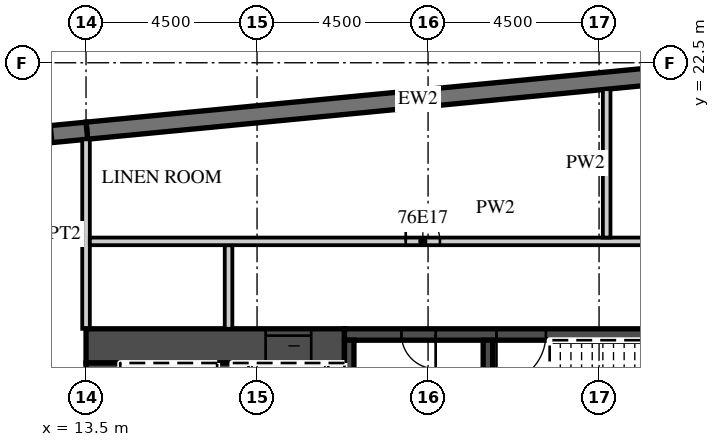
"""IFC4 building model, lengths in metres.
Left out: names, types, materials, properties, quantities, classifications, styles, units other than length and angle.
Written with IfcOpenShell. Run it as: python <this file> out.ifc"""

import sys

from ifc_helpers import new_model, si_unit, direction, frame, frame_2d, origin, place, context, subcontext, project, spatial, rectangle, extrude, element, fill, save


model = new_model("IFC4")
c1 = context("Model", 3, precision=1e-05, world=origin(), true_north=direction((0.0, 1.0)))
c2 = subcontext(c1, "Body", "Model", "MODEL_VIEW")
j1 = project(units=[si_unit("LENGTHUNIT", "METRE"), si_unit("PLANEANGLEUNIT", "RADIAN")], contexts=[c1])
p1 = place(None, origin())
s1 = spatial("IfcSite", under=j1, at=p1, CompositionType="ELEMENT")
p2 = place(p1, origin())
s2 = spatial("IfcBuilding", under=s1, at=p2, CompositionType="ELEMENT")
p3 = place(p2, frame((0.0, 0.0, 301.5)))
s3 = spatial("IfcBuildingStorey", under=s2, at=p3, CompositionType="ELEMENT", Elevation=301.5)
p4 = place(p3, frame((30.946, 22.391, 0.0), z_axis=(0.0, 0.0, 1.0), x_axis=(-0.995396397117, -0.095843688398, 0.0)))
e1 = element("IfcWall", 1, at=p4, inside=s3, PredefinedType="SOLIDWALL", context=c2, shape_type="SweptSolid", body=[
    extrude(rectangle(XDim=17.505, YDim=0.45, at=frame_2d((8.752, 0.0))), origin(), (0.0, 0.0, 1.0), 3.02),
])
p5 = place(p3, frame((13.521, 20.713, 0.0), z_axis=(0.0, 0.0, 1.0), x_axis=(-0.995396277313, -0.095844932638, 0.0)))
e2 = element("IfcWall", 2, at=p5, inside=s3, PredefinedType="SOLIDWALL", context=c2, shape_type="SweptSolid", body=[
    extrude(rectangle(XDim=51.495, YDim=0.45, at=frame_2d((25.748, 0.0))), origin(), (0.0, 0.0, 1.0), 3.02),
])
p6 = place(p5, frame((0.91, 0.0, 0.45)))
e3 = element("IfcOpeningElement", 3, at=p6, cuts=e2, PredefinedType="OPENING", context=c2, shape_type="SweptSolid", body=[
    extrude(rectangle(XDim=2.7, YDim=2.25, at=frame_2d((1.35, 1.125))), frame((0.0, 0.235, 0.0), z_axis=(0.0, -1.0, 0.0), x_axis=(1.0, 0.0, 0.0)), (0.0, 0.0, 1.0), 0.47),
])
p7 = place(p5, frame((5.431, 0.0, 0.45)))
e4 = element("IfcOpeningElement", 4, at=p7, cuts=e2, PredefinedType="OPENING", context=c2, shape_type="SweptSolid", body=[
    extrude(rectangle(XDim=2.7, YDim=2.25, at=frame_2d((1.35, 1.125))), frame((0.0, 0.235, 0.0), z_axis=(0.0, -1.0, 0.0), x_axis=(1.0, 0.0, 0.0)), (0.0, 0.0, 1.0), 0.47),
])
p8 = place(p5, frame((9.952, 0.0, 0.45)))
e5 = element("IfcOpeningElement", 5, at=p8, cuts=e2, PredefinedType="OPENING", context=c2, shape_type="SweptSolid", body=[
    extrude(rectangle(XDim=2.7, YDim=2.25, at=frame_2d((1.35, 1.125))), frame((0.0, 0.235, 0.0), z_axis=(0.0, -1.0, 0.0), x_axis=(1.0, 0.0, 0.0)), (0.0, 0.0, 1.0), 0.47),
])
p9 = place(p5, frame((14.473, 0.0, 0.45)))
e6 = element("IfcOpeningElement", 6, at=p9, cuts=e2, PredefinedType="OPENING", context=c2, shape_type="SweptSolid", body=[
    extrude(rectangle(XDim=2.7, YDim=2.25, at=frame_2d((1.35, 1.125))), frame((0.0, 0.235, 0.0), z_axis=(0.0, -1.0, 0.0), x_axis=(1.0, 0.0, 0.0)), (0.0, 0.0, 1.0), 0.47),
])
p10 = place(p5, frame((18.994, 0.0, 0.45)))
e7 = element("IfcOpeningElement", 7, at=p10, cuts=e2, PredefinedType="OPENING", context=c2, shape_type="SweptSolid", body=[
    extrude(rectangle(XDim=2.7, YDim=2.25, at=frame_2d((1.35, 1.125))), frame((0.0, 0.235, 0.0), z_axis=(0.0, -1.0, 0.0), x_axis=(1.0, 0.0, 0.0)), (0.0, 0.0, 1.0), 0.47),
])
p11 = place(p5, frame((23.514, 0.0, 0.45)))
e8 = element("IfcOpeningElement", 8, at=p11, cuts=e2, PredefinedType="OPENING", context=c2, shape_type="SweptSolid", body=[
    extrude(rectangle(XDim=2.7, YDim=2.25, at=frame_2d((1.35, 1.125))), frame((0.0, 0.235, 0.0), z_axis=(0.0, -1.0, 0.0), x_axis=(1.0, 0.0, 0.0)), (0.0, 0.0, 1.0), 0.47),
])
p12 = place(p5, frame((28.035, 0.0, 0.45)))
e9 = element("IfcOpeningElement", 9, at=p12, cuts=e2, PredefinedType="OPENING", context=c2, shape_type="SweptSolid", body=[
    extrude(rectangle(XDim=2.7, YDim=2.25, at=frame_2d((1.35, 1.125))), frame((0.0, 0.235, 0.0), z_axis=(0.0, -1.0, 0.0), x_axis=(1.0, 0.0, 0.0)), (0.0, 0.0, 1.0), 0.47),
])
p13 = place(p5, frame((32.556, 0.0, 0.45)))
e10 = element("IfcOpeningElement", 10, at=p13, cuts=e2, PredefinedType="OPENING", context=c2, shape_type="SweptSolid", body=[
    extrude(rectangle(XDim=2.7, YDim=2.25, at=frame_2d((1.35, 1.125))), frame((0.0, 0.235, 0.0), z_axis=(0.0, -1.0, 0.0), x_axis=(1.0, 0.0, 0.0)), (0.0, 0.0, 1.0), 0.47),
])
p14 = place(p5, frame((37.077, 0.0, 0.45)))
e11 = element("IfcOpeningElement", 11, at=p14, cuts=e2, PredefinedType="OPENING", context=c2, shape_type="SweptSolid", body=[
    extrude(rectangle(XDim=2.7, YDim=2.25, at=frame_2d((1.35, 1.125))), frame((0.0, 0.235, 0.0), z_axis=(0.0, -1.0, 0.0), x_axis=(1.0, 0.0, 0.0)), (0.0, 0.0, 1.0), 0.47),
])
p15 = place(p5, frame((41.598, 0.0, 0.45)))
e12 = element("IfcOpeningElement", 12, at=p15, cuts=e2, PredefinedType="OPENING", context=c2, shape_type="SweptSolid", body=[
    extrude(rectangle(XDim=2.7, YDim=2.25, at=frame_2d((1.35, 1.125))), frame((0.0, 0.235, 0.0), z_axis=(0.0, -1.0, 0.0), x_axis=(1.0, 0.0, 0.0)), (0.0, 0.0, 1.0), 0.47),
])
p16 = place(p5, frame((46.118, 0.0, 0.45)))
e13 = element("IfcOpeningElement", 13, at=p16, cuts=e2, PredefinedType="OPENING", context=c2, shape_type="SweptSolid", body=[
    extrude(rectangle(XDim=2.7, YDim=2.25, at=frame_2d((1.35, 1.125))), frame((0.0, 0.235, 0.0), z_axis=(0.0, -1.0, 0.0), x_axis=(1.0, 0.0, 0.0)), (0.0, 0.0, 1.0), 0.47),
])
p17 = place(p3, frame((13.5, 15.5, 0.0), z_axis=(0.0, 0.0, 1.0), x_axis=(0.0, 1.0, 0.0)))
e14 = element("IfcWall", 14, at=p17, inside=s3, PredefinedType="PARTITIONING", context=c2, shape_type="SweptSolid", body=[
    extrude(rectangle(XDim=4.985, YDim=0.2, at=frame_2d((2.493, 0.0))), origin(), (0.0, 0.0, 1.0), 3.02),
])
p18 = place(p3, frame((13.5, 15.05, 0.0), z_axis=(0.0, 0.0, 1.0), x_axis=(1.0, 0.0, 0.0)))
e15 = element("IfcWall", 15, at=p18, inside=s3, PredefinedType="SHEAR", context=c2, shape_type="SweptSolid", body=[
    extrude(rectangle(XDim=6.8, YDim=0.9, at=frame_2d((3.4, 0.0))), origin(), (0.0, 0.0, 1.0), 3.02),
])
p19 = place(p18, frame((4.725, 0.0, 0.0)))
e16 = element("IfcOpeningElement", 16, at=p19, cuts=e15, PredefinedType="OPENING", context=c2, shape_type="SweptSolid", body=[
    extrude(rectangle(XDim=1.2, YDim=2.1, at=frame_2d((0.6, 1.05))), frame((0.0, 0.46, 0.0), z_axis=(0.0, -1.0, 0.0), x_axis=(1.0, 0.0, 0.0)), (0.0, 0.0, 1.0), 0.92),
])
p20 = place(p3, frame((20.3, 15.35, 0.0), z_axis=(0.0, 0.0, 1.0), x_axis=(1.0, 0.0, 0.0)))
e17 = element("IfcWall", 17, at=p20, inside=s3, PredefinedType="SHEAR", context=c2, shape_type="SweptSolid", body=[
    extrude(rectangle(XDim=10.3, YDim=0.3, at=frame_2d((5.15, 0.0))), origin(), (0.0, 0.0, 1.0), 3.02),
])
p21 = place(p20, frame((4.0, 0.0, 0.0)))
e18 = element("IfcOpeningElement", 18, at=p21, cuts=e17, PredefinedType="OPENING", context=c2, shape_type="SweptSolid", body=[
    extrude(rectangle(XDim=1.3, YDim=2.1, at=frame_2d((0.65, 1.05))), frame((0.0, 0.16, 0.0), z_axis=(0.0, -1.0, 0.0), x_axis=(1.0, 0.0, 0.0)), (0.0, 0.0, 1.0), 0.32),
])
p22 = place(p20, frame((1.5, 0.0, 0.0)))
e19 = element("IfcOpeningElement", 19, at=p22, cuts=e17, PredefinedType="OPENING", context=c2, shape_type="SweptSolid", body=[
    extrude(rectangle(XDim=0.9, YDim=2.1, at=frame_2d((0.45, 1.05))), frame((0.0, 0.16, 0.0), z_axis=(0.0, -1.0, 0.0), x_axis=(1.0, 0.0, 0.0)), (0.0, 0.0, 1.0), 0.32),
])
p23 = place(p3, frame((13.95, 2.4, 0.0), z_axis=(0.0, 0.0, 1.0), x_axis=(0.0, 1.0, 0.0)))
e20 = element("IfcWall", 20, at=p23, inside=s3, PredefinedType="SHEAR", context=c2, shape_type="SweptSolid", body=[
    extrude(rectangle(XDim=12.2, YDim=0.9, at=frame_2d((6.1, 0.0))), origin(), (0.0, 0.0, 1.0), 3.02),
])
p24 = place(p3, frame((17.15, 8.8, 0.0), z_axis=(0.0, 0.0, 1.0), x_axis=(0.0, 1.0, 0.0)))
e21 = element("IfcWall", 21, at=p24, inside=s3, PredefinedType="SHEAR", context=c2, shape_type="SweptSolid", body=[
    extrude(rectangle(XDim=5.8, YDim=0.4, at=frame_2d((2.9, 0.0))), origin(), (0.0, 0.0, 1.0), 3.02),
])
for number, where, z_axis, x_axis in (
    (22, (20.425, 11.95, 0.0), (0.0, 0.0, 1.0), (0.0, 1.0, 0.0)),
    (23, (24.075, 11.95, 0.0), (0.0, 0.0, 1.0), (0.0, 1.0, 0.0)),
):
    element("IfcWall", number, at=place(p3, frame(where, z_axis=z_axis, x_axis=x_axis)), inside=s3, PredefinedType="SHEAR", context=c2, shape_type="SweptSolid", body=[
        extrude(rectangle(XDim=3.25, YDim=0.25, at=frame_2d((1.625, 0.0))), origin(), (0.0, 0.0, 1.0), 3.02),
    ])
p25 = place(p3, frame((17.25, 15.5, 0.0), z_axis=(0.0, 0.0, 1.0), x_axis=(0.0, 1.0, 0.0)))
e24 = element("IfcWall", 24, at=p25, inside=s3, PredefinedType="PARTITIONING", context=c2, shape_type="SweptSolid", body=[
    extrude(rectangle(XDim=2.2, YDim=0.2, at=frame_2d((1.1, 0.0))), origin(), (0.0, 0.0, 1.0), 3.02),
])
p26 = place(p3, frame((13.6, 17.8, 0.0), z_axis=(0.0, 0.0, 1.0), x_axis=(1.0, 0.0, 0.0)))
e25 = element("IfcWall", 25, at=p26, inside=s3, PredefinedType="PARTITIONING", context=c2, shape_type="SweptSolid", body=[
    extrude(rectangle(XDim=21.354, YDim=0.2, at=frame_2d((10.677, 0.0))), origin(), (0.0, 0.0, 1.0), 3.02),
])
p27 = place(p26, frame((16.613, 0.0, 0.0)))
e26 = element("IfcOpeningElement", 26, at=p27, cuts=e25, PredefinedType="OPENING", context=c2, shape_type="SweptSolid", body=[
    extrude(rectangle(XDim=0.9, YDim=2.1, at=frame_2d((0.45, 1.05))), frame((0.0, 0.11, 0.0), z_axis=(0.0, -1.0, 0.0), x_axis=(1.0, 0.0, 0.0)), (0.0, 0.0, 1.0), 0.22),
])
p28 = place(p26, frame((8.312, 0.0, 0.0)))
e27 = element("IfcOpeningElement", 27, at=p28, cuts=e25, PredefinedType="OPENING", context=c2, shape_type="SweptSolid", body=[
    extrude(rectangle(XDim=0.9, YDim=2.1, at=frame_2d((0.45, 1.05))), frame((0.0, 0.11, 0.0), z_axis=(0.0, -1.0, 0.0), x_axis=(1.0, 0.0, 0.0)), (0.0, 0.0, 1.0), 0.22),
])
p29 = place(p3, frame((27.2, 17.9, 0.0), z_axis=(0.0, 0.0, 1.0), x_axis=(0.0, 1.0, 0.0)))
e28 = element("IfcWall", 28, at=p29, inside=s3, PredefinedType="PARTITIONING", context=c2, shape_type="SweptSolid", body=[
    extrude(rectangle(XDim=3.905, YDim=0.2, at=frame_2d((1.953, 0.0))), origin(), (0.0, 0.0, 1.0), 3.02),
])
p30 = place(p6, origin())
e29 = element("IfcWindow", 29, at=p30, inside=s3, PartitioningType="SINGLE_PANEL", PredefinedType="WINDOW", context=c2, shape_type="SweptSolid", body=[
    extrude(rectangle(XDim=2.7, YDim=2.25, at=frame_2d((1.35, 1.125))), frame((0.0, 0.09, 0.0), z_axis=(0.0, -1.0, 0.0), x_axis=(1.0, 0.0, 0.0)), (0.0, 0.0, 1.0), 0.06),
])
fill(e3, e29)
p31 = place(p19, origin())
e30 = element("IfcDoor", 30, at=p31, inside=s3, OperationType="SLIDING_TO_LEFT", PredefinedType="DOOR", context=c2, shape_type="SweptSolid", body=[
    extrude(rectangle(XDim=1.2, YDim=2.1, at=frame_2d((0.6, 1.05))), frame((0.0, 0.025, 0.0), z_axis=(0.0, -1.0, 0.0), x_axis=(1.0, 0.0, 0.0)), (0.0, 0.0, 1.0), 0.05),
])
fill(e16, e30)
p32 = place(p21, origin())
e31 = element("IfcDoor", 31, at=p32, inside=s3, OperationType="SINGLE_SWING_LEFT", PredefinedType="DOOR", context=c2, shape_type="SweptSolid", body=[
    extrude(rectangle(XDim=1.3, YDim=2.1, at=frame_2d((0.65, 1.05))), frame((0.0, 0.025, 0.0), z_axis=(0.0, -1.0, 0.0), x_axis=(1.0, 0.0, 0.0)), (0.0, 0.0, 1.0), 0.05),
])
fill(e18, e31)
p33 = place(p22, origin())
e32 = element("IfcDoor", 32, at=p33, inside=s3, OperationType="SINGLE_SWING_RIGHT", PredefinedType="DOOR", context=c2, shape_type="SweptSolid", body=[
    extrude(rectangle(XDim=0.9, YDim=2.1, at=frame_2d((0.45, 1.05))), frame((0.0, 0.025, 0.0), z_axis=(0.0, -1.0, 0.0), x_axis=(1.0, 0.0, 0.0)), (0.0, 0.0, 1.0), 0.05),
])
fill(e19, e32)
p34 = place(p28, origin())
e33 = element("IfcDoor", 33, at=p34, inside=s3, OperationType="SINGLE_SWING_LEFT", PredefinedType="DOOR", context=c2, shape_type="SweptSolid", body=[
    extrude(rectangle(XDim=0.9, YDim=2.1, at=frame_2d((0.45, 1.05))), frame((0.0, 0.025, 0.0), z_axis=(0.0, -1.0, 0.0), x_axis=(1.0, 0.0, 0.0)), (0.0, 0.0, 1.0), 0.05),
])
fill(e27, e33)
save(model, sys.argv[1])
